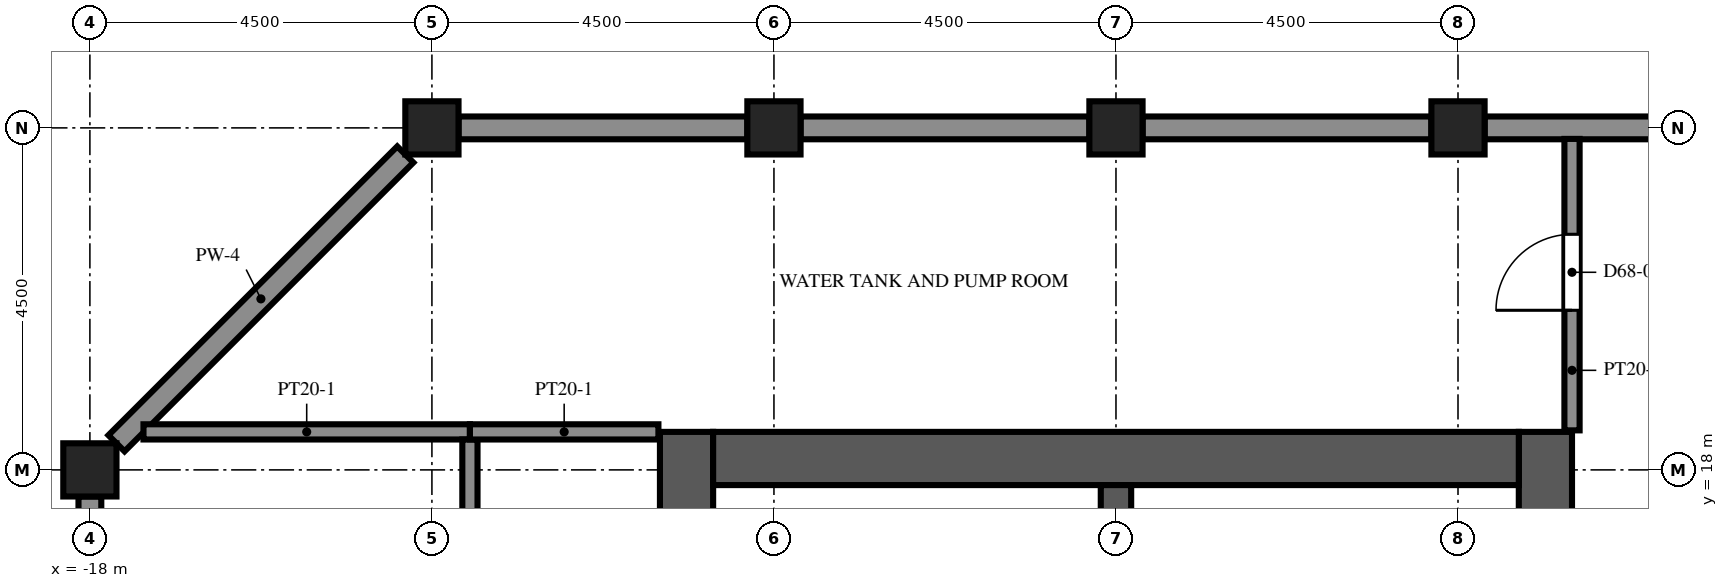
"""IFC4 building model, lengths in metres.
Left out: names, types, materials, properties, quantities, classifications, styles, units other than length and angle.
Written with IfcOpenShell. Run it as: python <this file> out.ifc"""

import sys

from ifc_helpers import new_model, si_unit, direction, frame, frame_2d, origin, origin_2d, place, context, subcontext, project, spatial, rectangle, extrude, element, fill, save


model = new_model("IFC4")
c1 = context("Model", 3, precision=1e-05, world=origin(), true_north=direction((0.0, 1.0)))
c2 = subcontext(c1, "Body", "Model", "MODEL_VIEW")
j1 = project(units=[si_unit("LENGTHUNIT", "METRE"), si_unit("PLANEANGLEUNIT", "RADIAN")], contexts=[c1])
p1 = place(None, origin())
s1 = spatial("IfcSite", under=j1, at=p1, CompositionType="ELEMENT")
p2 = place(p1, origin())
s2 = spatial("IfcBuilding", under=s1, at=p2, CompositionType="ELEMENT")
p3 = place(p2, frame((0.0, 0.0, 301.0)))
s3 = spatial("IfcBuildingStorey", under=s2, at=p3, CompositionType="ELEMENT", Elevation=301.0)
for number, where, z_axis, x_axis in (
    (1, (-18.0, 18.0, -0.6), (0.0, 0.0, 1.0), (1.0, 0.0, 0.0)),
    (2, (-13.5, 22.5, -0.6), (0.0, 0.0, 1.0), (1.0, 0.0, 0.0)),
    (3, (-9.0, 22.5, -0.6), (0.0, 0.0, 1.0), (1.0, 0.0, 0.0)),
    (4, (-4.5, 22.5, -0.6), (0.0, 0.0, 1.0), (1.0, 0.0, 0.0)),
    (5, (0.0, 22.5, -0.6), (0.0, 0.0, 1.0), (1.0, 0.0, 0.0)),
):
    element("IfcColumn", number, at=place(p3, frame(where, z_axis=z_axis, x_axis=x_axis)), inside=s3, PredefinedType="COLUMN", context=c2, shape_type="SweptSolid", body=[
        extrude(rectangle(XDim=0.7, YDim=0.7, at=origin_2d()), origin(), (0.0, 0.0, 1.0), 6.0),
    ])
p4 = place(p3, frame((-10.15, -9.0, 0.0), z_axis=(0.0, 0.0, 1.0), x_axis=(0.0, 1.0, 0.0)))
e6 = element("IfcWall", 6, at=p4, inside=s3, PredefinedType="SHEAR", context=c2, shape_type="SweptSolid", body=[
    extrude(rectangle(XDim=27.5, YDim=0.7, at=frame_2d((13.75, 0.0))), origin(), (0.0, 0.0, 1.0), 5.4),
])
p5 = place(p4, frame((12.55, 0.0, 0.0)))
e7 = element("IfcOpeningElement", 7, at=p5, cuts=e6, PredefinedType="OPENING", context=c2, shape_type="SweptSolid", body=[
    extrude(rectangle(XDim=2.4, YDim=2.4, at=frame_2d((1.2, 1.2))), frame((0.0, 0.36, 0.0), z_axis=(0.0, -1.0, 0.0), x_axis=(1.0, 0.0, 0.0)), (0.0, 0.0, 1.0), 0.72),
])
p6 = place(p4, frame((6.825, 0.0, 0.0)))
e8 = element("IfcOpeningElement", 8, at=p6, cuts=e6, PredefinedType="OPENING", context=c2, shape_type="SweptSolid", body=[
    extrude(rectangle(XDim=1.2, YDim=2.1, at=frame_2d((0.6, 1.05))), frame((0.0, 0.36, 0.0), z_axis=(0.0, -1.0, 0.0), x_axis=(1.0, 0.0, 0.0)), (0.0, 0.0, 1.0), 0.72),
])
p7 = place(p4, frame((19.475, 0.0, 0.0)))
e9 = element("IfcOpeningElement", 9, at=p7, cuts=e6, PredefinedType="OPENING", context=c2, shape_type="SweptSolid", body=[
    extrude(rectangle(XDim=1.2, YDim=2.1, at=frame_2d((0.6, 1.05))), frame((0.0, 0.36, 0.0), z_axis=(0.0, -1.0, 0.0), x_axis=(1.0, 0.0, 0.0)), (0.0, 0.0, 1.0), 0.72),
])
p8 = place(p3, frame((1.15, -9.0, 0.0), z_axis=(0.0, 0.0, 1.0), x_axis=(0.0, 1.0, 0.0)))
e10 = element("IfcWall", 10, at=p8, inside=s3, PredefinedType="SHEAR", context=c2, shape_type="SweptSolid", body=[
    extrude(rectangle(XDim=27.5, YDim=0.7, at=frame_2d((13.75, 0.0))), origin(), (0.0, 0.0, 1.0), 5.4),
])
p9 = place(p8, frame((12.55, 0.0, 0.0)))
e11 = element("IfcOpeningElement", 11, at=p9, cuts=e10, PredefinedType="OPENING", context=c2, shape_type="SweptSolid", body=[
    extrude(rectangle(XDim=2.4, YDim=2.4, at=frame_2d((1.2, 1.2))), frame((0.0, 0.36, 0.0), z_axis=(0.0, -1.0, 0.0), x_axis=(1.0, 0.0, 0.0)), (0.0, 0.0, 1.0), 0.72),
])
p10 = place(p8, frame((5.46, 0.0, 0.0)))
e12 = element("IfcOpeningElement", 12, at=p10, cuts=e10, PredefinedType="OPENING", context=c2, shape_type="SweptSolid", body=[
    extrude(rectangle(XDim=0.968, YDim=2.1, at=frame_2d((0.484, 1.05))), frame((0.0, 0.36, 0.0), z_axis=(0.0, -1.0, 0.0), x_axis=(1.0, 0.0, 0.0)), (0.0, 0.0, 1.0), 0.72),
])
p11 = place(p8, frame((23.54, 0.0, 0.0)))
e13 = element("IfcOpeningElement", 13, at=p11, cuts=e10, PredefinedType="OPENING", context=c2, shape_type="SweptSolid", body=[
    extrude(rectangle(XDim=1.2, YDim=2.1, at=frame_2d((0.6, 1.05))), frame((0.0, 0.36, 0.0), z_axis=(0.0, -1.0, 0.0), x_axis=(1.0, 0.0, 0.0)), (0.0, 0.0, 1.0), 0.72),
])
p12 = place(p3, frame((-9.8, 18.15, 0.0), z_axis=(0.0, 0.0, 1.0), x_axis=(1.0, 0.0, 0.0)))
e14 = element("IfcWall", 14, at=p12, inside=s3, PredefinedType="SHEAR", context=c2, shape_type="SweptSolid", body=[
    extrude(rectangle(XDim=10.6, YDim=0.7, at=frame_2d((5.3, 0.0))), origin(), (0.0, 0.0, 1.0), 5.4),
])
p13 = place(p3, frame((-4.5, 10.2, 0.0), z_axis=(0.0, 0.0, 1.0), x_axis=(0.0, 1.0, 0.0)))
e15 = element("IfcWall", 15, at=p13, inside=s3, PredefinedType="SHEAR", context=c2, shape_type="SweptSolid", body=[
    extrude(rectangle(XDim=7.6, YDim=0.4, at=frame_2d((3.8, 0.0))), origin(), (0.0, 0.0, 1.0), 5.4),
])
for number, where, z_axis, x_axis in (
    (16, (4.15, 22.5, 0.0), (0.0, 0.0, 1.0), (-1.0, 0.0, 0.0)),
    (17, (-0.35, 22.5, 0.0), (0.0, 0.0, 1.0), (-1.0, 0.0, 0.0)),
    (18, (-4.85, 22.5, 0.0), (0.0, 0.0, 1.0), (-1.0, 0.0, 0.0)),
    (19, (-9.35, 22.5, 0.0), (0.0, 0.0, 1.0), (-1.0, 0.0, 0.0)),
):
    element("IfcWall", number, at=place(p3, frame(where, z_axis=z_axis, x_axis=x_axis)), inside=s3, PredefinedType="SOLIDWALL", context=c2, shape_type="SweptSolid", body=[
        extrude(rectangle(XDim=3.8, YDim=0.3, at=frame_2d((1.9, 0.0))), origin(), (0.0, 0.0, 1.0), 0.85),
    ])
p14 = place(p3, frame((-13.85, 22.15, 0.0), z_axis=(0.0, 0.0, 1.0), x_axis=(-0.707106781187, -0.707106781187, 0.0)))
e20 = element("IfcWall", 20, at=p14, inside=s3, PredefinedType="SOLIDWALL", context=c2, shape_type="SweptSolid", body=[
    extrude(rectangle(XDim=5.374, YDim=0.3, at=frame_2d((2.687, 0.0))), origin(), (0.0, 0.0, 1.0), 4.1),
])
p15 = place(p3, frame((-18.0, 17.65, 0.0), z_axis=(0.0, 0.0, 1.0), x_axis=(0.0, -1.0, 0.0)))
e21 = element("IfcWall", 21, at=p15, inside=s3, PredefinedType="SOLIDWALL", context=c2, shape_type="SweptSolid", body=[
    extrude(rectangle(XDim=3.8, YDim=0.3, at=frame_2d((1.9, 0.0))), origin(), (0.0, 0.0, 1.0), 0.85),
])
p16 = place(p3, frame((-22.3, 22.417, 0.0), z_axis=(0.0, 0.0, 1.0), x_axis=(0.707106781187, 0.707106781187, 0.0)))
e22 = element("IfcWall", 22, at=p16, inside=s3, PredefinedType="PARAPET", context=c2, shape_type="SweptSolid", body=[
    extrude(rectangle(XDim=6.198, YDim=0.2, at=frame_2d((3.099, 0.0))), origin(), (0.0, 0.0, 1.0), 1.1),
])
p17 = place(p3, frame((-17.295, 18.5, 0.0), z_axis=(0.0, 0.0, 1.0), x_axis=(1.0, 0.0, 0.0)))
e23 = element("IfcWall", 23, at=p17, inside=s3, PredefinedType="PARTITIONING", context=c2, shape_type="SweptSolid", body=[
    extrude(rectangle(XDim=4.295, YDim=0.2, at=frame_2d((2.147, 0.0))), origin(), (0.0, 0.0, 1.0), 4.8),
])
p18 = place(p3, frame((-13.0, 8.5, 0.0), z_axis=(0.0, 0.0, 1.0), x_axis=(0.0, 1.0, 0.0)))
e24 = element("IfcWall", 24, at=p18, inside=s3, PredefinedType="PARTITIONING", context=c2, shape_type="SweptSolid", body=[
    extrude(rectangle(XDim=9.9, YDim=0.2, at=frame_2d((4.95, 0.0))), origin(), (0.0, 0.0, 1.0), 4.8),
])
p19 = place(p18, frame((4.6, 0.0, 0.0)))
e25 = element("IfcOpeningElement", 25, at=p19, cuts=e24, PredefinedType="OPENING", context=c2, shape_type="SweptSolid", body=[
    extrude(rectangle(XDim=1.0, YDim=2.1, at=frame_2d((0.5, 1.05))), frame((0.0, 0.11, 0.0), z_axis=(0.0, -1.0, 0.0), x_axis=(1.0, 0.0, 0.0)), (0.0, 0.0, 1.0), 0.22),
])
p20 = place(p3, frame((-13.0, 18.5, 0.0), z_axis=(0.0, 0.0, 1.0), x_axis=(1.0, 0.0, 0.0)))
e26 = element("IfcWall", 26, at=p20, inside=s3, PredefinedType="PARTITIONING", context=c2, shape_type="SweptSolid", body=[
    extrude(rectangle(XDim=2.48, YDim=0.2, at=frame_2d((1.24, 0.0))), origin(), (0.0, 0.0, 1.0), 4.8),
])
p21 = place(p3, frame((1.5, 18.52, 0.0), z_axis=(0.0, 0.0, 1.0), x_axis=(0.0, 1.0, 0.0)))
e27 = element("IfcWall", 27, at=p21, inside=s3, PredefinedType="PARTITIONING", context=c2, shape_type="SweptSolid", body=[
    extrude(rectangle(XDim=3.835, YDim=0.2, at=frame_2d((1.917, 0.0))), origin(), (0.0, 0.0, 1.0), 4.8),
])
p22 = place(p21, frame((1.58, 0.0, 0.0)))
e28 = element("IfcOpeningElement", 28, at=p22, cuts=e27, PredefinedType="OPENING", context=c2, shape_type="SweptSolid", body=[
    extrude(rectangle(XDim=1.0, YDim=2.1, at=frame_2d((0.5, 1.05))), frame((0.0, 0.11, 0.0), z_axis=(0.0, -1.0, 0.0), x_axis=(1.0, 0.0, 0.0)), (0.0, 0.0, 1.0), 0.22),
])
p23 = place(p3, frame((-0.5, 15.14, 0.0), z_axis=(0.0, 0.0, 1.0), x_axis=(0.0, 1.0, 0.0)))
e29 = element("IfcWall", 29, at=p23, inside=s3, PredefinedType="PARTITIONING", context=c2, shape_type="SweptSolid", body=[
    extrude(rectangle(XDim=2.66, YDim=0.1, at=frame_2d((1.33, 0.0))), origin(), (0.0, 0.0, 1.0), 4.8),
])
p24 = place(p23, frame((0.83, 0.0, 0.0)))
e30 = element("IfcOpeningElement", 30, at=p24, cuts=e29, PredefinedType="OPENING", context=c2, shape_type="SweptSolid", body=[
    extrude(rectangle(XDim=1.0, YDim=2.1, at=frame_2d((0.5, 1.05))), frame((0.0, 0.06, 0.0), z_axis=(0.0, -1.0, 0.0), x_axis=(1.0, 0.0, 0.0)), (0.0, 0.0, 1.0), 0.12),
])
p25 = place(p22, origin())
e31 = element("IfcDoor", 31, at=p25, inside=s3, OperationType="SINGLE_SWING_LEFT", PredefinedType="DOOR", context=c2, shape_type="SweptSolid", body=[
    extrude(rectangle(XDim=1.0, YDim=2.1, at=frame_2d((0.5, 1.05))), frame((0.0, 0.025, 0.0), z_axis=(0.0, -1.0, 0.0), x_axis=(1.0, 0.0, 0.0)), (0.0, 0.0, 1.0), 0.05),
])
fill(e28, e31)
save(model, sys.argv[1])
